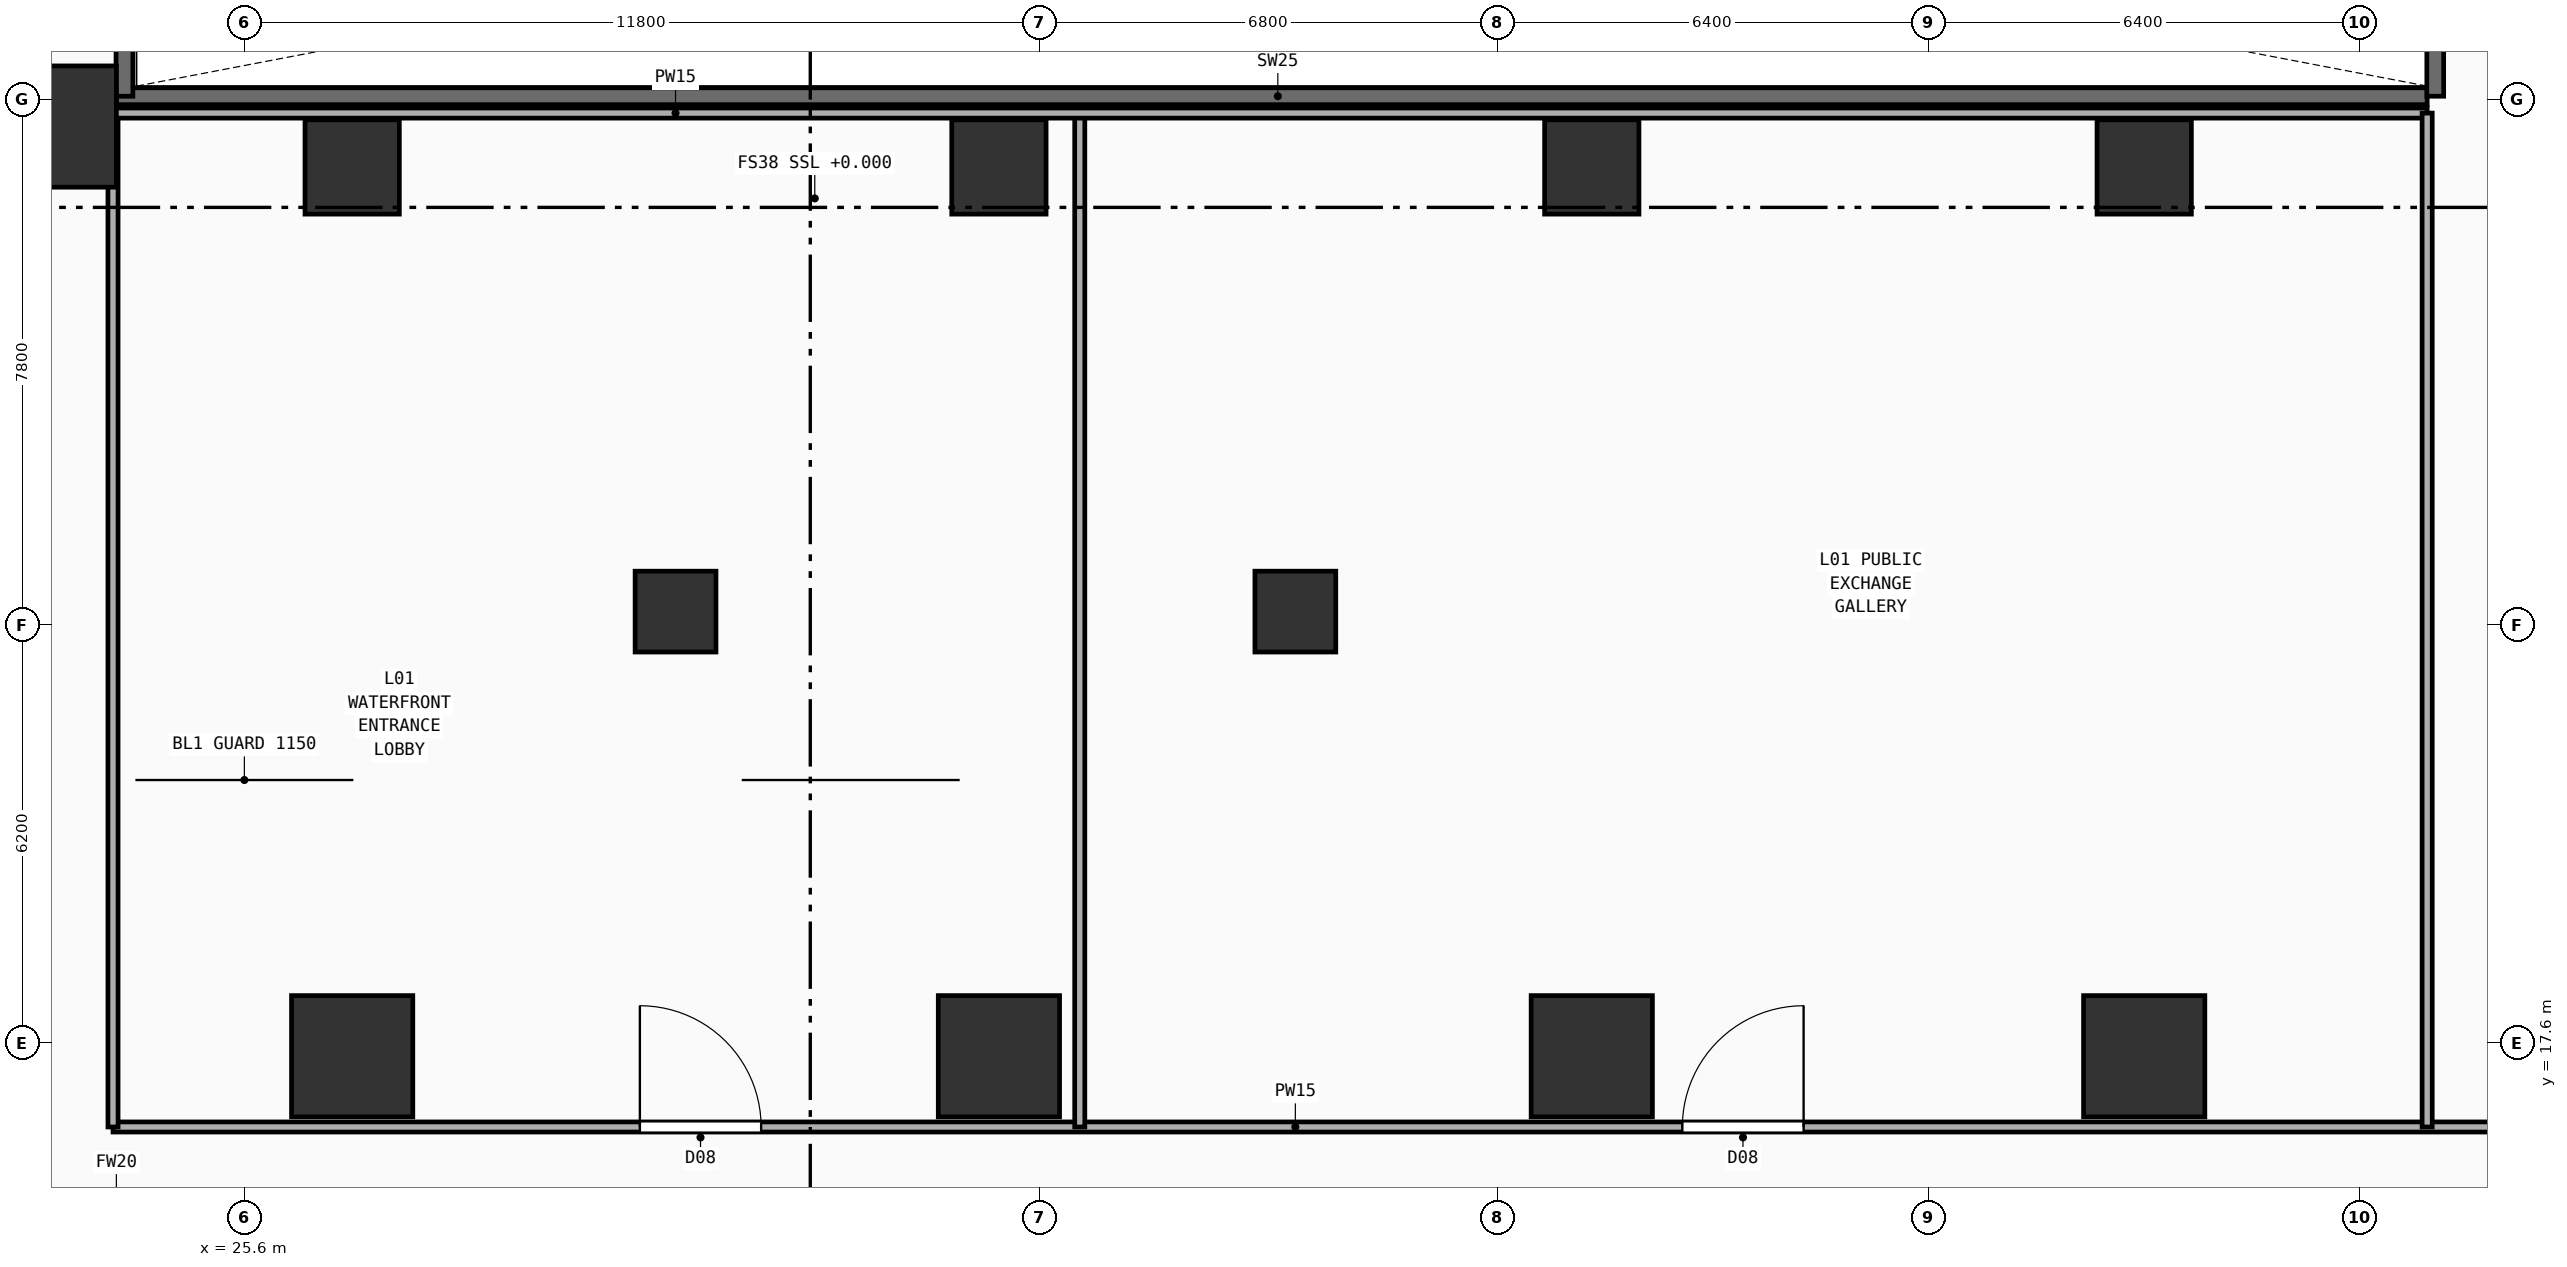
"""IFC4 building model, lengths in metres.
Left out: names, types, materials, properties, quantities, classifications, styles, units other than length and angle.
Written with IfcOpenShell. Run it as: python <this file> out.ifc"""

import sys

from ifc_helpers import new_model, si_unit, direction, frame, frame_2d, origin, origin_2d, place, context, subcontext, project, spatial, rectangle, circle, extrude, element, fill, save


model = new_model("IFC4")
c1 = context("Model", 3, precision=1e-05, world=origin(), true_north=direction((0.0, 1.0)))
c2 = subcontext(c1, "Body", "Model", "MODEL_VIEW")
j1 = project(units=[si_unit("LENGTHUNIT", "METRE"), si_unit("PLANEANGLEUNIT", "RADIAN")], contexts=[c1])
p1 = place(None, origin())
s1 = spatial("IfcSite", under=j1, at=p1, CompositionType="ELEMENT")
p2 = place(p1, origin())
s2 = spatial("IfcBuilding", under=s1, at=p2, CompositionType="ELEMENT")
p3 = place(p2, origin())
s3 = spatial("IfcBuildingStorey", under=s2, at=p3, CompositionType="ELEMENT", Elevation=0.0)
p4 = place(p3, frame((23.7, 31.65, 0.0), z_axis=(0.0, 0.0, 1.0), x_axis=(1.0, 0.0, 0.0)))
e1 = element("IfcWall", 1, at=p4, inside=s3, PredefinedType="SOLIDWALL", context=c2, shape_type="SweptSolid", body=[
    extrude(rectangle(XDim=34.3, YDim=0.25, at=frame_2d((17.15, 0.0))), origin(), (0.0, 0.0, 1.0), 5.26),
])
p5 = place(p3, frame((23.82, 31.65, 0.0), z_axis=(0.0, 0.0, 1.0), x_axis=(0.0, 1.0, 0.0)))
e2 = element("IfcWall", 2, at=p5, inside=s3, PredefinedType="SOLIDWALL", context=c2, shape_type="SweptSolid", body=[
    extrude(rectangle(XDim=6.8, YDim=0.25, at=frame_2d((3.4, 0.0))), origin(), (0.0, 0.0, 1.0), 5.26),
])
p6 = place(p3, frame((58.12, 31.65, 0.0), z_axis=(0.0, 0.0, 1.0), x_axis=(0.0, 1.0, 0.0)))
e3 = element("IfcWall", 3, at=p6, inside=s3, PredefinedType="SOLIDWALL", context=c2, shape_type="SweptSolid", body=[
    extrude(rectangle(XDim=7.41, YDim=0.25, at=frame_2d((3.705, 0.0))), origin(), (0.0, 0.0, 1.0), 5.26),
])
p7 = place(p6, frame((1.3, 0.0, 0.0)))
e4 = element("IfcOpeningElement", 4, at=p7, cuts=e3, PredefinedType="OPENING", context=c2, shape_type="SweptSolid", body=[
    extrude(rectangle(XDim=4.2, YDim=3.2, at=frame_2d((2.1, 1.6))), frame((0.0, 0.135, 0.0), z_axis=(0.0, -1.0, 0.0), x_axis=(1.0, 0.0, 0.0)), (0.0, 0.0, 1.0), 0.27),
])
for number, where, z_axis, x_axis in (
    (5, (27.2, 17.4, 0.0), (0.0, 0.0, 1.0), (1.0, 0.0, 0.0)),
    (6, (36.8, 17.4, 0.0), (0.0, 0.0, 1.0), (1.0, 0.0, 0.0)),
    (7, (45.6, 17.4, 0.0), (0.0, 0.0, 1.0), (1.0, 0.0, 0.0)),
    (8, (53.8, 17.4, 0.0), (0.0, 0.0, 1.0), (1.0, 0.0, 0.0)),
    (9, (22.8, 31.2, 0.0), (0.0, 0.0, 1.0), (1.0, 0.0, 0.0)),
):
    element("IfcColumn", number, at=place(p3, frame(where, z_axis=z_axis, x_axis=x_axis)), inside=s3, PredefinedType="COLUMN", context=c2, shape_type="SweptSolid", body=[
        extrude(rectangle(XDim=1.8, YDim=1.8, at=origin_2d()), origin(), (0.0, 0.0, 1.0), 5.26),
    ])
for number, where, z_axis, x_axis in (
    (10, (27.2, 30.6, 0.0), (0.0, 0.0, 1.0), (1.0, 0.0, 0.0)),
    (11, (36.8, 30.6, 0.0), (0.0, 0.0, 1.0), (1.0, 0.0, 0.0)),
    (12, (45.6, 30.6, 0.0), (0.0, 0.0, 1.0), (1.0, 0.0, 0.0)),
    (13, (53.8, 30.6, 0.0), (0.0, 0.0, 1.0), (1.0, 0.0, 0.0)),
):
    element("IfcColumn", number, at=place(p3, frame(where, z_axis=z_axis, x_axis=x_axis)), inside=s3, PredefinedType="COLUMN", context=c2, shape_type="SweptSolid", body=[
        extrude(rectangle(XDim=1.4, YDim=1.4, at=origin_2d()), origin(), (0.0, 0.0, 1.0), 5.26),
    ])
for number, where, z_axis, x_axis in (
    (14, (32.0, 24.0, 0.0), (0.0, 0.0, 1.0), (1.0, 0.0, 0.0)),
    (15, (41.2, 24.0, 0.0), (0.0, 0.0, 1.0), (1.0, 0.0, 0.0)),
):
    element("IfcColumn", number, at=place(p3, frame(where, z_axis=z_axis, x_axis=x_axis)), inside=s3, PredefinedType="COLUMN", context=c2, shape_type="SweptSolid", body=[
        extrude(circle(Radius=0.6, at=origin_2d()), origin(), (0.0, 0.0, 1.0), 5.26),
    ])
p8 = place(p3, frame((23.65, 16.35, 0.0), z_axis=(0.0, 0.0, 1.0), x_axis=(1.0, 0.0, 0.0)))
e16 = element("IfcWall", 16, at=p8, inside=s3, PredefinedType="PARTITIONING", context=c2, shape_type="SweptSolid", body=[
    extrude(rectangle(XDim=40.9, YDim=0.15, at=frame_2d((20.45, 0.0))), origin(), (0.0, 0.0, 1.0), 5.26),
])
p9 = place(p8, frame((7.821, 0.0, 0.0)))
e17 = element("IfcOpeningElement", 17, at=p9, cuts=e16, PredefinedType="OPENING", context=c2, shape_type="SweptSolid", body=[
    extrude(rectangle(XDim=1.8, YDim=2.4, at=frame_2d((0.9, 1.2))), frame((0.0, 0.085, 0.0), z_axis=(0.0, -1.0, 0.0), x_axis=(1.0, 0.0, 0.0)), (0.0, 0.0, 1.0), 0.17),
])
p10 = place(p8, frame((23.294, 0.0, 0.0)))
e18 = element("IfcOpeningElement", 18, at=p10, cuts=e16, PredefinedType="OPENING", context=c2, shape_type="SweptSolid", body=[
    extrude(rectangle(XDim=1.8, YDim=2.4, at=frame_2d((0.9, 1.2))), frame((0.0, 0.085, 0.0), z_axis=(0.0, -1.0, 0.0), x_axis=(1.0, 0.0, 0.0)), (0.0, 0.0, 1.0), 0.17),
])
for number, where, z_axis, x_axis in (
    (19, (23.65, 16.35, 0.0), (0.0, 0.0, 1.0), (0.0, 1.0, 0.0)),
    (20, (38.0, 16.35, 0.0), (0.0, 0.0, 1.0), (0.0, 1.0, 0.0)),
):
    element("IfcWall", number, at=place(p3, frame(where, z_axis=z_axis, x_axis=x_axis)), inside=s3, PredefinedType="PARTITIONING", context=c2, shape_type="SweptSolid", body=[
        extrude(rectangle(XDim=15.05, YDim=0.15, at=frame_2d((7.525, 0.0))), origin(), (0.0, 0.0, 1.0), 5.26),
    ])
p11 = place(p3, frame((23.65, 31.4, 0.0), z_axis=(0.0, 0.0, 1.0), x_axis=(1.0, 0.0, 0.0)))
e21 = element("IfcWall", 21, at=p11, inside=s3, PredefinedType="PARTITIONING", context=c2, shape_type="SweptSolid", body=[
    extrude(rectangle(XDim=34.35, YDim=0.15, at=frame_2d((17.175, 0.0))), origin(), (0.0, 0.0, 1.0), 5.26),
])
p12 = place(p3, frame((58.0, 16.35, 0.0), z_axis=(0.0, 0.0, 1.0), x_axis=(0.0, 1.0, 0.0)))
e22 = element("IfcWall", 22, at=p12, inside=s3, PredefinedType="PARTITIONING", context=c2, shape_type="SweptSolid", body=[
    extrude(rectangle(XDim=15.05, YDim=0.15, at=frame_2d((7.525, 0.0))), origin(), (0.0, 0.0, 1.0), 5.26),
])
p13 = place(p9, origin())
e23 = element("IfcDoor", 23, at=p13, inside=s3, OperationType="SINGLE_SWING_LEFT", PredefinedType="DOOR", context=c2, shape_type="SweptSolid", body=[
    extrude(rectangle(XDim=1.8, YDim=2.4, at=frame_2d((0.9, 1.2))), frame((0.0, 0.025, 0.0), z_axis=(0.0, -1.0, 0.0), x_axis=(1.0, 0.0, 0.0)), (0.0, 0.0, 1.0), 0.05),
])
fill(e17, e23)
p14 = place(p10, origin())
e24 = element("IfcDoor", 24, at=p14, inside=s3, OperationType="SINGLE_SWING_RIGHT", PredefinedType="DOOR", context=c2, shape_type="SweptSolid", body=[
    extrude(rectangle(XDim=1.8, YDim=2.4, at=frame_2d((0.9, 1.2))), frame((0.0, 0.025, 0.0), z_axis=(0.0, -1.0, 0.0), x_axis=(1.0, 0.0, 0.0)), (0.0, 0.0, 1.0), 0.05),
])
fill(e18, e24)
save(model, sys.argv[1])
